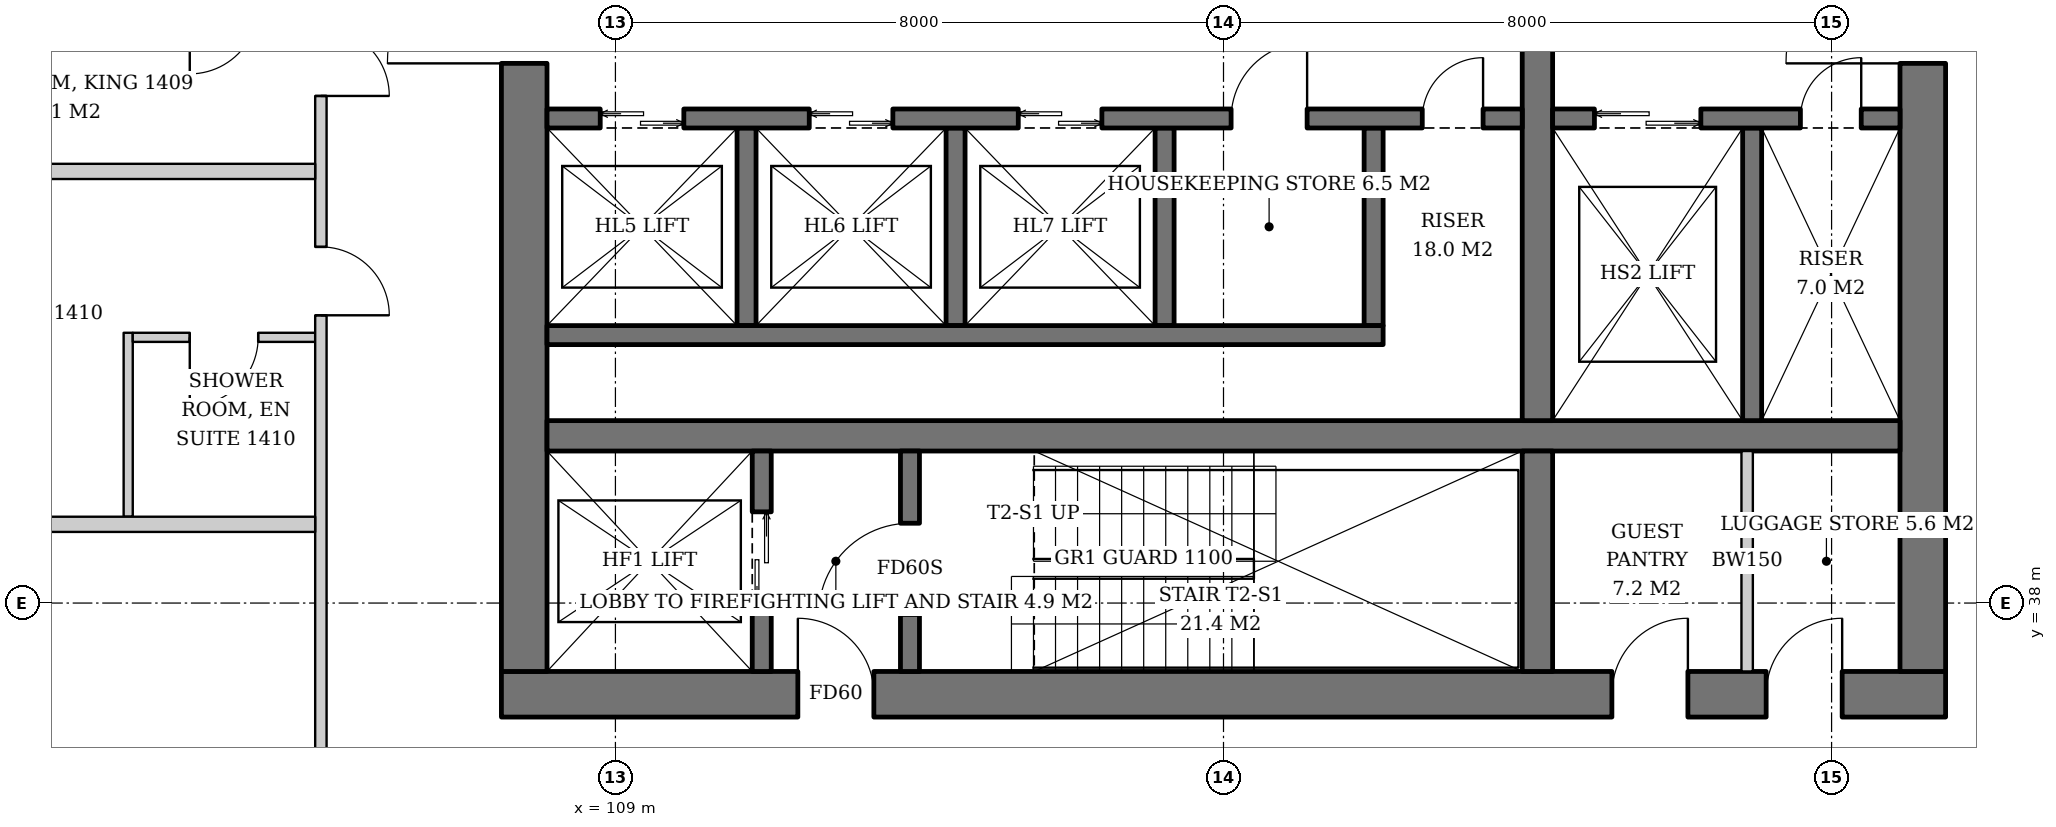
"""IFC4 building model, lengths in metres.
Left out: names, types, materials, properties, quantities, classifications, styles, units other than length and angle.
Written with IfcOpenShell. Run it as: python <this file> out.ifc"""

import sys

from ifc_helpers import new_model, si_unit, direction, frame, frame_2d, origin, place, context, subcontext, project, spatial, rectangle, extrude, element, fill, save


model = new_model("IFC4")
c1 = context("Model", 3, precision=1e-05, world=origin(), true_north=direction((0.0, 1.0)))
c2 = subcontext(c1, "Body", "Model", "MODEL_VIEW")
j1 = project(units=[si_unit("LENGTHUNIT", "METRE"), si_unit("PLANEANGLEUNIT", "RADIAN")], contexts=[c1])
p1 = place(None, origin())
s1 = spatial("IfcSite", under=j1, at=p1, CompositionType="ELEMENT")
p2 = place(p1, origin())
s2 = spatial("IfcBuilding", under=s1, at=p2, CompositionType="ELEMENT")
p3 = place(p2, frame((0.0, 0.0, 59.0)))
s3 = spatial("IfcBuildingStorey", under=s2, at=p3, CompositionType="ELEMENT", Elevation=59.0)
p4 = place(p3, frame((107.5, 36.8, 0.0), z_axis=(0.0, 0.0, 1.0), x_axis=(1.0, 0.0, 0.0)))
e1 = element("IfcWall", 1, at=p4, inside=s3, PredefinedType="SHEAR", context=c2, shape_type="SweptSolid", body=[
    extrude(rectangle(XDim=19.0, YDim=0.6, at=frame_2d((9.5, 0.0))), origin(), (0.0, 0.0, 1.0), 3.8),
])
p5 = place(p4, frame((3.9, 0.0, 0.0)))
e2 = element("IfcOpeningElement", 2, at=p5, cuts=e1, PredefinedType="OPENING", context=c2, shape_type="SweptSolid", body=[
    extrude(rectangle(XDim=1.0, YDim=2.1, at=frame_2d((0.5, 1.05))), frame((0.0, 0.31, 0.0), z_axis=(0.0, -1.0, 0.0), x_axis=(1.0, 0.0, 0.0)), (0.0, 0.0, 1.0), 0.62),
])
p6 = place(p4, frame((14.61, 0.0, 0.0)))
e3 = element("IfcOpeningElement", 3, at=p6, cuts=e1, PredefinedType="OPENING", context=c2, shape_type="SweptSolid", body=[
    extrude(rectangle(XDim=1.0, YDim=2.1, at=frame_2d((0.5, 1.05))), frame((0.0, 0.31, 0.0), z_axis=(0.0, -1.0, 0.0), x_axis=(1.0, 0.0, 0.0)), (0.0, 0.0, 1.0), 0.62),
])
p7 = place(p4, frame((16.639, 0.0, 0.0)))
e4 = element("IfcOpeningElement", 4, at=p7, cuts=e1, PredefinedType="OPENING", context=c2, shape_type="SweptSolid", body=[
    extrude(rectangle(XDim=1.0, YDim=2.1, at=frame_2d((0.5, 1.05))), frame((0.0, 0.31, 0.0), z_axis=(0.0, -1.0, 0.0), x_axis=(1.0, 0.0, 0.0)), (0.0, 0.0, 1.0), 0.62),
])
p8 = place(p3, frame((107.8, 37.1, 0.0), z_axis=(0.0, 0.0, 1.0), x_axis=(0.0, 1.0, 0.0)))
e5 = element("IfcWall", 5, at=p8, inside=s3, PredefinedType="SHEAR", context=c2, shape_type="SweptSolid", body=[
    extrude(rectangle(XDim=17.8, YDim=0.6, at=frame_2d((8.9, 0.0))), origin(), (0.0, 0.0, 1.0), 3.8),
])
p9 = place(p8, frame((8.0, 0.0, 0.0)))
e6 = element("IfcOpeningElement", 6, at=p9, cuts=e5, PredefinedType="OPENING", context=c2, shape_type="SweptSolid", body=[
    extrude(rectangle(XDim=1.8, YDim=2.4, at=frame_2d((0.9, 1.2))), frame((0.0, 0.31, 0.0), z_axis=(0.0, -1.0, 0.0), x_axis=(1.0, 0.0, 0.0)), (0.0, 0.0, 1.0), 0.62),
])
p10 = place(p3, frame((126.2, 37.1, 0.0), z_axis=(0.0, 0.0, 1.0), x_axis=(0.0, 1.0, 0.0)))
e7 = element("IfcWall", 7, at=p10, inside=s3, PredefinedType="SHEAR", context=c2, shape_type="SweptSolid", body=[
    extrude(rectangle(XDim=17.8, YDim=0.6, at=frame_2d((8.9, 0.0))), origin(), (0.0, 0.0, 1.0), 3.8),
])
p11 = place(p10, frame((8.0, 0.0, 0.0)))
e8 = element("IfcOpeningElement", 8, at=p11, cuts=e7, PredefinedType="OPENING", context=c2, shape_type="SweptSolid", body=[
    extrude(rectangle(XDim=1.8, YDim=2.4, at=frame_2d((0.9, 1.2))), frame((0.0, 0.31, 0.0), z_axis=(0.0, -1.0, 0.0), x_axis=(1.0, 0.0, 0.0)), (0.0, 0.0, 1.0), 0.62),
])
p12 = place(p3, frame((108.1, 40.2, 0.0), z_axis=(0.0, 0.0, 1.0), x_axis=(1.0, 0.0, 0.0)))
e9 = element("IfcWall", 9, at=p12, inside=s3, PredefinedType="SHEAR", context=c2, shape_type="SweptSolid", body=[
    extrude(rectangle(XDim=17.8, YDim=0.4, at=frame_2d((8.9, 0.0))), origin(), (0.0, 0.0, 1.0), 3.8),
])
p13 = place(p3, frame((121.13, 37.1, 0.0), z_axis=(0.0, 0.0, 1.0), x_axis=(0.0, 1.0, 0.0)))
e10 = element("IfcWall", 10, at=p13, inside=s3, PredefinedType="SHEAR", context=c2, shape_type="SweptSolid", body=[
    extrude(rectangle(XDim=2.9, YDim=0.4, at=frame_2d((1.45, 0.0))), origin(), (0.0, 0.0, 1.0), 3.8),
])
p14 = place(p3, frame((121.13, 40.4, 0.0), z_axis=(0.0, 0.0, 1.0), x_axis=(0.0, 1.0, 0.0)))
e11 = element("IfcWall", 11, at=p14, inside=s3, PredefinedType="SHEAR", context=c2, shape_type="SweptSolid", body=[
    extrude(rectangle(XDim=11.2, YDim=0.4, at=frame_2d((5.6, 0.0))), origin(), (0.0, 0.0, 1.0), 3.8),
])
p15 = place(p3, frame((110.925, 37.1, 0.0), z_axis=(0.0, 0.0, 1.0), x_axis=(0.0, 1.0, 0.0)))
e12 = element("IfcWall", 12, at=p15, inside=s3, PredefinedType="SHEAR", context=c2, shape_type="SweptSolid", body=[
    extrude(rectangle(XDim=2.9, YDim=0.25, at=frame_2d((1.45, 0.0))), origin(), (0.0, 0.0, 1.0), 3.8),
])
p16 = place(p15, frame((0.8, 0.0, 0.0)))
e13 = element("IfcOpeningElement", 13, at=p16, cuts=e12, PredefinedType="OPENING", context=c2, shape_type="SweptSolid", body=[
    extrude(rectangle(XDim=1.3, YDim=2.2, at=frame_2d((0.65, 1.1))), frame((0.0, 0.135, 0.0), z_axis=(0.0, -1.0, 0.0), x_axis=(1.0, 0.0, 0.0)), (0.0, 0.0, 1.0), 0.27),
])
p17 = place(p3, frame((112.875, 37.1, 0.0), z_axis=(0.0, 0.0, 1.0), x_axis=(0.0, 1.0, 0.0)))
e14 = element("IfcWall", 14, at=p17, inside=s3, PredefinedType="SHEAR", context=c2, shape_type="SweptSolid", body=[
    extrude(rectangle(XDim=2.9, YDim=0.25, at=frame_2d((1.45, 0.0))), origin(), (0.0, 0.0, 1.0), 3.8),
])
p18 = place(p17, frame((0.75, 0.0, 0.0)))
e15 = element("IfcOpeningElement", 15, at=p18, cuts=e14, PredefinedType="OPENING", context=c2, shape_type="SweptSolid", body=[
    extrude(rectangle(XDim=1.2, YDim=2.1, at=frame_2d((0.6, 1.05))), frame((0.0, 0.135, 0.0), z_axis=(0.0, -1.0, 0.0), x_axis=(1.0, 0.0, 0.0)), (0.0, 0.0, 1.0), 0.27),
])
for number, where, z_axis, x_axis in (
    (16, (110.725, 44.25, 0.0), (0.0, 0.0, 1.0), (0.0, -1.0, 0.0)),
    (17, (113.475, 44.25, 0.0), (0.0, 0.0, 1.0), (0.0, -1.0, 0.0)),
    (18, (116.225, 44.25, 0.0), (0.0, 0.0, 1.0), (0.0, -1.0, 0.0)),
    (19, (118.975, 44.25, 0.0), (0.0, 0.0, 1.0), (0.0, -1.0, 0.0)),
):
    element("IfcWall", number, at=place(p3, frame(where, z_axis=z_axis, x_axis=x_axis)), inside=s3, PredefinedType="SHEAR", context=c2, shape_type="SweptSolid", body=[
        extrude(rectangle(XDim=2.6, YDim=0.25, at=frame_2d((1.3, 0.0))), origin(), (0.0, 0.0, 1.0), 3.8),
    ])
p19 = place(p3, frame((108.1, 41.525, 0.0), z_axis=(0.0, 0.0, 1.0), x_axis=(1.0, 0.0, 0.0)))
e20 = element("IfcWall", 20, at=p19, inside=s3, PredefinedType="SHEAR", context=c2, shape_type="SweptSolid", body=[
    extrude(rectangle(XDim=11.0, YDim=0.25, at=frame_2d((5.5, 0.0))), origin(), (0.0, 0.0, 1.0), 3.8),
])
p20 = place(p3, frame((108.1, 44.375, 0.0), z_axis=(0.0, 0.0, 1.0), x_axis=(1.0, 0.0, 0.0)))
e21 = element("IfcWall", 21, at=p20, inside=s3, PredefinedType="SHEAR", context=c2, shape_type="SweptSolid", body=[
    extrude(rectangle(XDim=12.83, YDim=0.25, at=frame_2d((6.415, 0.0))), origin(), (0.0, 0.0, 1.0), 3.8),
])
p21 = place(p20, frame((0.7, 0.0, 0.0)))
e22 = element("IfcOpeningElement", 22, at=p21, cuts=e21, PredefinedType="OPENING", context=c2, shape_type="SweptSolid", body=[
    extrude(rectangle(XDim=1.1, YDim=2.2, at=frame_2d((0.55, 1.1))), frame((0.0, 0.135, 0.0), z_axis=(0.0, -1.0, 0.0), x_axis=(1.0, 0.0, 0.0)), (0.0, 0.0, 1.0), 0.27),
])
p22 = place(p20, frame((3.45, 0.0, 0.0)))
e23 = element("IfcOpeningElement", 23, at=p22, cuts=e21, PredefinedType="OPENING", context=c2, shape_type="SweptSolid", body=[
    extrude(rectangle(XDim=1.1, YDim=2.2, at=frame_2d((0.55, 1.1))), frame((0.0, 0.135, 0.0), z_axis=(0.0, -1.0, 0.0), x_axis=(1.0, 0.0, 0.0)), (0.0, 0.0, 1.0), 0.27),
])
p23 = place(p20, frame((6.2, 0.0, 0.0)))
e24 = element("IfcOpeningElement", 24, at=p23, cuts=e21, PredefinedType="OPENING", context=c2, shape_type="SweptSolid", body=[
    extrude(rectangle(XDim=1.1, YDim=2.2, at=frame_2d((0.55, 1.1))), frame((0.0, 0.135, 0.0), z_axis=(0.0, -1.0, 0.0), x_axis=(1.0, 0.0, 0.0)), (0.0, 0.0, 1.0), 0.27),
])
p24 = place(p20, frame((9.0, 0.0, 0.0)))
e25 = element("IfcOpeningElement", 25, at=p24, cuts=e21, PredefinedType="OPENING", context=c2, shape_type="SweptSolid", body=[
    extrude(rectangle(XDim=1.0, YDim=2.1, at=frame_2d((0.5, 1.05))), frame((0.0, 0.135, 0.0), z_axis=(0.0, -1.0, 0.0), x_axis=(1.0, 0.0, 0.0)), (0.0, 0.0, 1.0), 0.27),
])
p25 = place(p20, frame((11.515, 0.0, 0.0)))
e26 = element("IfcOpeningElement", 26, at=p25, cuts=e21, PredefinedType="OPENING", context=c2, shape_type="SweptSolid", body=[
    extrude(rectangle(XDim=0.8, YDim=2.0, at=frame_2d((0.4, 1.0))), frame((0.0, 0.135, 0.0), z_axis=(0.0, -1.0, 0.0), x_axis=(1.0, 0.0, 0.0)), (0.0, 0.0, 1.0), 0.27),
])
p26 = place(p3, frame((123.955, 44.25, 0.0), z_axis=(0.0, 0.0, 1.0), x_axis=(0.0, -1.0, 0.0)))
e27 = element("IfcWall", 27, at=p26, inside=s3, PredefinedType="SHEAR", context=c2, shape_type="SweptSolid", body=[
    extrude(rectangle(XDim=3.85, YDim=0.25, at=frame_2d((1.925, 0.0))), origin(), (0.0, 0.0, 1.0), 3.8),
])
p27 = place(p3, frame((121.33, 44.375, 0.0), z_axis=(0.0, 0.0, 1.0), x_axis=(1.0, 0.0, 0.0)))
e28 = element("IfcWall", 28, at=p27, inside=s3, PredefinedType="SHEAR", context=c2, shape_type="SweptSolid", body=[
    extrude(rectangle(XDim=4.57, YDim=0.25, at=frame_2d((2.285, 0.0))), origin(), (0.0, 0.0, 1.0), 3.8),
])
p28 = place(p27, frame((0.55, 0.0, 0.0)))
e29 = element("IfcOpeningElement", 29, at=p28, cuts=e28, PredefinedType="OPENING", context=c2, shape_type="SweptSolid", body=[
    extrude(rectangle(XDim=1.4, YDim=2.4, at=frame_2d((0.7, 1.2))), frame((0.0, 0.135, 0.0), z_axis=(0.0, -1.0, 0.0), x_axis=(1.0, 0.0, 0.0)), (0.0, 0.0, 1.0), 0.27),
])
p29 = place(p27, frame((3.26, 0.0, 0.0)))
e30 = element("IfcOpeningElement", 30, at=p29, cuts=e28, PredefinedType="OPENING", context=c2, shape_type="SweptSolid", body=[
    extrude(rectangle(XDim=0.8, YDim=2.0, at=frame_2d((0.4, 1.0))), frame((0.0, 0.135, 0.0), z_axis=(0.0, -1.0, 0.0), x_axis=(1.0, 0.0, 0.0)), (0.0, 0.0, 1.0), 0.27),
])
p30 = place(p3, frame((123.889, 37.1, 0.0), z_axis=(0.0, 0.0, 1.0), x_axis=(0.0, 1.0, 0.0)))
e31 = element("IfcWall", 31, at=p30, inside=s3, PredefinedType="SOLIDWALL", context=c2, shape_type="SweptSolid", body=[
    extrude(rectangle(XDim=2.9, YDim=0.15, at=frame_2d((1.45, 0.0))), origin(), (0.0, 0.0, 1.0), 3.6),
])
p31 = place(p3, frame((102.59, 41.556, 0.0), z_axis=(0.0, 0.0, 1.0), x_axis=(0.0, -1.0, 0.0)))
e32 = element("IfcWall", 32, at=p31, inside=s3, PredefinedType="PARTITIONING", context=c2, shape_type="SweptSolid", body=[
    extrude(rectangle(XDim=2.42, YDim=0.12, at=frame_2d((1.21, 0.0))), origin(), (0.0, 0.0, 1.0), 3.6),
])
p32 = place(p3, frame((105.05, 41.496, 0.0), z_axis=(0.0, 0.0, 1.0), x_axis=(-1.0, 0.0, 0.0)))
e33 = element("IfcWall", 33, at=p32, inside=s3, PredefinedType="PARTITIONING", context=c2, shape_type="SweptSolid", body=[
    extrude(rectangle(XDim=2.4, YDim=0.12, at=frame_2d((1.2, 0.0))), origin(), (0.0, 0.0, 1.0), 3.6),
])
p33 = place(p32, frame((0.75, 0.0, 0.0)))
e34 = element("IfcOpeningElement", 34, at=p33, cuts=e33, PredefinedType="OPENING", context=c2, shape_type="SweptSolid", body=[
    extrude(rectangle(XDim=0.9, YDim=2.1, at=frame_2d((0.45, 1.05))), frame((0.0, 0.07, 0.0), z_axis=(0.0, -1.0, 0.0), x_axis=(1.0, 0.0, 0.0)), (0.0, 0.0, 1.0), 0.14),
])
p34 = place(p3, frame((105.125, 57.95, 0.0), z_axis=(0.0, 0.0, 1.0), x_axis=(0.0, -1.0, 0.0)))
e35 = element("IfcWall", 35, at=p34, inside=s3, PredefinedType="PARTITIONING", context=c2, shape_type="SweptSolid", body=[
    extrude(rectangle(XDim=23.75, YDim=0.15, at=frame_2d((11.875, 0.0))), origin(), (0.0, 0.0, 1.0), 2.8),
])
p35 = place(p34, frame((2.068, 0.0, 0.0)))
e36 = element("IfcOpeningElement", 36, at=p35, cuts=e35, PredefinedType="OPENING", context=c2, shape_type="SweptSolid", body=[
    extrude(rectangle(XDim=0.9, YDim=2.1, at=frame_2d((0.45, 1.05))), frame((0.0, 0.085, 0.0), z_axis=(0.0, -1.0, 0.0), x_axis=(1.0, 0.0, 0.0)), (0.0, 0.0, 1.0), 0.17),
])
p36 = place(p34, frame((7.686, 0.0, 0.0)))
e37 = element("IfcOpeningElement", 37, at=p36, cuts=e35, PredefinedType="OPENING", context=c2, shape_type="SweptSolid", body=[
    extrude(rectangle(XDim=1.0, YDim=2.1, at=frame_2d((0.5, 1.05))), frame((0.0, 0.085, 0.0), z_axis=(0.0, -1.0, 0.0), x_axis=(1.0, 0.0, 0.0)), (0.0, 0.0, 1.0), 0.17),
])
p37 = place(p34, frame((12.379, 0.0, 0.0)))
e38 = element("IfcOpeningElement", 38, at=p37, cuts=e35, PredefinedType="OPENING", context=c2, shape_type="SweptSolid", body=[
    extrude(rectangle(XDim=0.9, YDim=2.1, at=frame_2d((0.45, 1.05))), frame((0.0, 0.085, 0.0), z_axis=(0.0, -1.0, 0.0), x_axis=(1.0, 0.0, 0.0)), (0.0, 0.0, 1.0), 0.17),
])
p38 = place(p34, frame((15.264, 0.0, 0.0)))
e39 = element("IfcOpeningElement", 39, at=p38, cuts=e35, PredefinedType="OPENING", context=c2, shape_type="SweptSolid", body=[
    extrude(rectangle(XDim=0.9, YDim=2.1, at=frame_2d((0.45, 1.05))), frame((0.0, 0.085, 0.0), z_axis=(0.0, -1.0, 0.0), x_axis=(1.0, 0.0, 0.0)), (0.0, 0.0, 1.0), 0.17),
])
p39 = place(p3, frame((105.05, 43.678, 0.0), z_axis=(0.0, 0.0, 1.0), x_axis=(-1.0, 0.0, 0.0)))
e40 = element("IfcWall", 40, at=p39, inside=s3, PredefinedType="PARTITIONING", context=c2, shape_type="SweptSolid", body=[
    extrude(rectangle(XDim=7.34, YDim=0.2, at=frame_2d((3.67, 0.0))), origin(), (0.0, 0.0, 1.0), 3.05),
])
p40 = place(p3, frame((105.05, 39.036, 0.0), z_axis=(0.0, 0.0, 1.0), x_axis=(-1.0, 0.0, 0.0)))
e41 = element("IfcWall", 41, at=p40, inside=s3, PredefinedType="PARTITIONING", context=c2, shape_type="SweptSolid", body=[
    extrude(rectangle(XDim=4.842, YDim=0.2, at=frame_2d((2.421, 0.0))), origin(), (0.0, 0.0, 1.0), 3.6),
])
p41 = place(p16, origin())
e42 = element("IfcDoor", 42, at=p41, inside=s3, OperationType="DOUBLE_DOOR_SLIDING", PredefinedType="DOOR", context=c2, shape_type="SweptSolid", body=[
    extrude(rectangle(XDim=1.3, YDim=2.2, at=frame_2d((0.65, 1.1))), frame((0.0, 0.025, 0.0), z_axis=(0.0, -1.0, 0.0), x_axis=(1.0, 0.0, 0.0)), (0.0, 0.0, 1.0), 0.05),
])
fill(e13, e42)
p42 = place(p18, origin())
e43 = element("IfcDoor", 43, at=p42, inside=s3, OperationType="SINGLE_SWING_LEFT", PredefinedType="DOOR", context=c2, shape_type="SweptSolid", body=[
    extrude(rectangle(XDim=1.2, YDim=2.1, at=frame_2d((0.6, 1.05))), frame((0.0, 0.025, 0.0), z_axis=(0.0, -1.0, 0.0), x_axis=(1.0, 0.0, 0.0)), (0.0, 0.0, 1.0), 0.05),
])
fill(e15, e43)
p43 = place(p21, origin())
e44 = element("IfcDoor", 44, at=p43, inside=s3, OperationType="DOUBLE_DOOR_SLIDING", PredefinedType="DOOR", context=c2, shape_type="SweptSolid", body=[
    extrude(rectangle(XDim=1.1, YDim=2.2, at=frame_2d((0.55, 1.1))), frame((0.0, 0.025, 0.0), z_axis=(0.0, -1.0, 0.0), x_axis=(1.0, 0.0, 0.0)), (0.0, 0.0, 1.0), 0.05),
])
fill(e22, e44)
p44 = place(p22, origin())
e45 = element("IfcDoor", 45, at=p44, inside=s3, OperationType="DOUBLE_DOOR_SLIDING", PredefinedType="DOOR", context=c2, shape_type="SweptSolid", body=[
    extrude(rectangle(XDim=1.1, YDim=2.2, at=frame_2d((0.55, 1.1))), frame((0.0, 0.025, 0.0), z_axis=(0.0, -1.0, 0.0), x_axis=(1.0, 0.0, 0.0)), (0.0, 0.0, 1.0), 0.05),
])
fill(e23, e45)
p45 = place(p23, origin())
e46 = element("IfcDoor", 46, at=p45, inside=s3, OperationType="DOUBLE_DOOR_SLIDING", PredefinedType="DOOR", context=c2, shape_type="SweptSolid", body=[
    extrude(rectangle(XDim=1.1, YDim=2.2, at=frame_2d((0.55, 1.1))), frame((0.0, 0.025, 0.0), z_axis=(0.0, -1.0, 0.0), x_axis=(1.0, 0.0, 0.0)), (0.0, 0.0, 1.0), 0.05),
])
fill(e24, e46)
p46 = place(p24, origin())
e47 = element("IfcDoor", 47, at=p46, inside=s3, OperationType="SINGLE_SWING_RIGHT", PredefinedType="DOOR", context=c2, shape_type="SweptSolid", body=[
    extrude(rectangle(XDim=1.0, YDim=2.1, at=frame_2d((0.5, 1.05))), frame((0.0, 0.025, 0.0), z_axis=(0.0, -1.0, 0.0), x_axis=(1.0, 0.0, 0.0)), (0.0, 0.0, 1.0), 0.05),
])
fill(e25, e47)
p47 = place(p25, origin())
e48 = element("IfcDoor", 48, at=p47, inside=s3, OperationType="SINGLE_SWING_RIGHT", PredefinedType="DOOR", context=c2, shape_type="SweptSolid", body=[
    extrude(rectangle(XDim=0.8, YDim=2.0, at=frame_2d((0.4, 1.0))), frame((0.0, 0.025, 0.0), z_axis=(0.0, -1.0, 0.0), x_axis=(1.0, 0.0, 0.0)), (0.0, 0.0, 1.0), 0.05),
])
fill(e26, e48)
p48 = place(p28, origin())
e49 = element("IfcDoor", 49, at=p48, inside=s3, OperationType="DOUBLE_DOOR_SLIDING", PredefinedType="DOOR", context=c2, shape_type="SweptSolid", body=[
    extrude(rectangle(XDim=1.4, YDim=2.4, at=frame_2d((0.7, 1.2))), frame((0.0, 0.025, 0.0), z_axis=(0.0, -1.0, 0.0), x_axis=(1.0, 0.0, 0.0)), (0.0, 0.0, 1.0), 0.05),
])
fill(e29, e49)
p49 = place(p29, origin())
e50 = element("IfcDoor", 50, at=p49, inside=s3, OperationType="SINGLE_SWING_RIGHT", PredefinedType="DOOR", context=c2, shape_type="SweptSolid", body=[
    extrude(rectangle(XDim=0.8, YDim=2.0, at=frame_2d((0.4, 1.0))), frame((0.0, 0.025, 0.0), z_axis=(0.0, -1.0, 0.0), x_axis=(1.0, 0.0, 0.0)), (0.0, 0.0, 1.0), 0.05),
])
fill(e30, e50)
p50 = place(p5, origin())
e51 = element("IfcDoor", 51, at=p50, inside=s3, OperationType="SINGLE_SWING_LEFT", PredefinedType="DOOR", context=c2, shape_type="SweptSolid", body=[
    extrude(rectangle(XDim=1.0, YDim=2.1, at=frame_2d((0.5, 1.05))), frame((0.0, 0.025, 0.0), z_axis=(0.0, -1.0, 0.0), x_axis=(1.0, 0.0, 0.0)), (0.0, 0.0, 1.0), 0.05),
])
fill(e2, e51)
p51 = place(p9, origin())
e52 = element("IfcDoor", 52, at=p51, inside=s3, OperationType="DOUBLE_DOOR_SINGLE_SWING", PredefinedType="DOOR", context=c2, shape_type="SweptSolid", body=[
    extrude(rectangle(XDim=1.8, YDim=2.4, at=frame_2d((0.9, 1.2))), frame((0.0, 0.025, 0.0), z_axis=(0.0, -1.0, 0.0), x_axis=(1.0, 0.0, 0.0)), (0.0, 0.0, 1.0), 0.05),
])
fill(e6, e52)
p52 = place(p11, origin())
e53 = element("IfcDoor", 53, at=p52, inside=s3, OperationType="DOUBLE_DOOR_SINGLE_SWING", PredefinedType="DOOR", context=c2, shape_type="SweptSolid", body=[
    extrude(rectangle(XDim=1.8, YDim=2.4, at=frame_2d((0.9, 1.2))), frame((0.0, 0.025, 0.0), z_axis=(0.0, -1.0, 0.0), x_axis=(1.0, 0.0, 0.0)), (0.0, 0.0, 1.0), 0.05),
])
fill(e8, e53)
p53 = place(p6, origin())
e54 = element("IfcDoor", 54, at=p53, inside=s3, OperationType="SINGLE_SWING_RIGHT", PredefinedType="DOOR", context=c2, shape_type="SweptSolid", body=[
    extrude(rectangle(XDim=1.0, YDim=2.1, at=frame_2d((0.5, 1.05))), frame((0.0, 0.29, 0.0), z_axis=(0.0, -1.0, 0.0), x_axis=(1.0, 0.0, 0.0)), (0.0, 0.0, 1.0), 0.05),
])
fill(e3, e54)
p54 = place(p7, origin())
e55 = element("IfcDoor", 55, at=p54, inside=s3, OperationType="SINGLE_SWING_RIGHT", PredefinedType="DOOR", context=c2, shape_type="SweptSolid", body=[
    extrude(rectangle(XDim=1.0, YDim=2.1, at=frame_2d((0.5, 1.05))), frame((0.0, 0.29, 0.0), z_axis=(0.0, -1.0, 0.0), x_axis=(1.0, 0.0, 0.0)), (0.0, 0.0, 1.0), 0.05),
])
fill(e4, e55)
p55 = place(p33, origin())
e56 = element("IfcDoor", 56, at=p55, inside=s3, OperationType="SINGLE_SWING_RIGHT", PredefinedType="DOOR", context=c2, shape_type="SweptSolid", body=[
    extrude(rectangle(XDim=0.9, YDim=2.1, at=frame_2d((0.45, 1.05))), frame((0.0, 0.025, 0.0), z_axis=(0.0, -1.0, 0.0), x_axis=(1.0, 0.0, 0.0)), (0.0, 0.0, 1.0), 0.05),
])
fill(e34, e56)
p56 = place(p37, origin())
e57 = element("IfcDoor", 57, at=p56, inside=s3, OperationType="SINGLE_SWING_RIGHT", PredefinedType="DOOR", context=c2, shape_type="SweptSolid", body=[
    extrude(rectangle(XDim=0.9, YDim=2.1, at=frame_2d((0.45, 1.05))), frame((0.0, 0.025, 0.0), z_axis=(0.0, -1.0, 0.0), x_axis=(1.0, 0.0, 0.0)), (0.0, 0.0, 1.0), 0.05),
])
fill(e38, e57)
p57 = place(p38, origin())
e58 = element("IfcDoor", 58, at=p57, inside=s3, OperationType="SINGLE_SWING_RIGHT", PredefinedType="DOOR", context=c2, shape_type="SweptSolid", body=[
    extrude(rectangle(XDim=0.9, YDim=2.1, at=frame_2d((0.45, 1.05))), frame((0.0, 0.025, 0.0), z_axis=(0.0, -1.0, 0.0), x_axis=(1.0, 0.0, 0.0)), (0.0, 0.0, 1.0), 0.05),
])
fill(e39, e58)
save(model, sys.argv[1])
